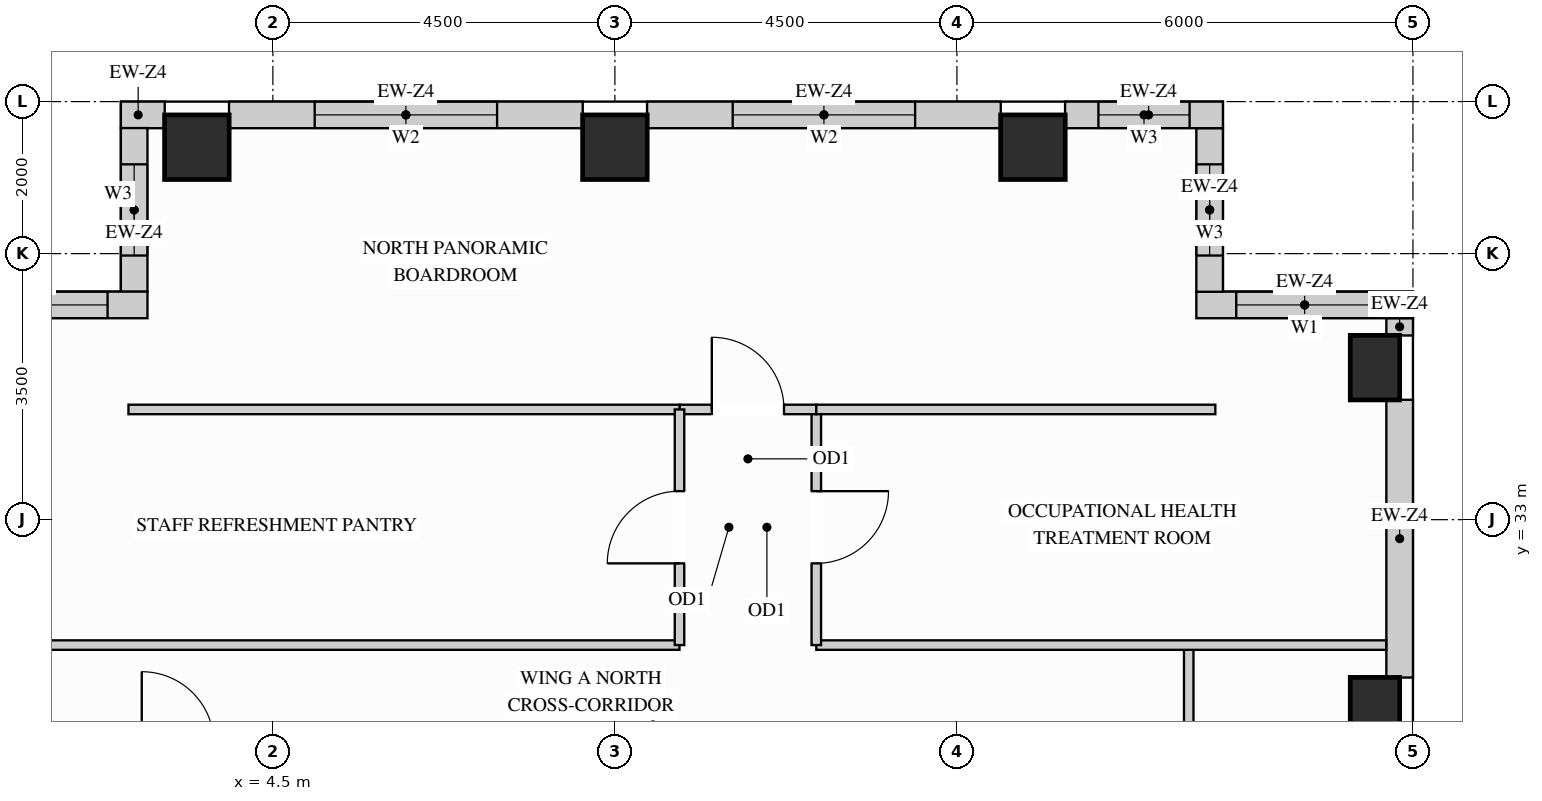
"""IFC4 building model, lengths in metres.
Left out: names, types, materials, properties, quantities, classifications, styles, units other than length and angle.
Written with IfcOpenShell. Run it as: python <this file> out.ifc"""

import sys

from ifc_helpers import new_model, si_unit, direction, frame, frame_2d, origin, origin_2d, place, context, subcontext, project, spatial, rectangle, extrude, source, transform, mapped, element, fill, save


model = new_model("IFC4")
c1 = context("Model", 3, precision=1e-05, world=origin(), true_north=direction((0.0, 1.0)))
c2 = subcontext(c1, "Body", "Model", "MODEL_VIEW")
j1 = project(units=[si_unit("LENGTHUNIT", "METRE"), si_unit("PLANEANGLEUNIT", "RADIAN")], contexts=[c1])
p1 = place(None, origin())
s1 = spatial("IfcSite", under=j1, at=p1, CompositionType="ELEMENT")
p2 = place(p1, origin())
s2 = spatial("IfcBuilding", under=s1, at=p2, CompositionType="ELEMENT")
p3 = place(p2, frame((0.0, 0.0, 226.8)))
s3 = spatial("IfcBuildingStorey", under=s2, at=p3, CompositionType="ELEMENT", Elevation=226.8)
m1 = source(origin(), c2, "Body", "SweptSolid", [
    extrude(rectangle(XDim=0.65, YDim=0.85, at=origin_2d()), origin(), (0.0, 0.0, 1.0), 3.4),
])
for number, where, z_axis, x_axis in (
    (1, (19.0, 30.5, 0.0), (0.0, 0.0, 1.0), (1.0, 0.0, 0.0)),
    (2, (19.0, 35.0, 0.0), (0.0, 0.0, 1.0), (1.0, 0.0, 0.0)),
):
    element("IfcColumn", number, at=place(p3, frame(where, z_axis=z_axis, x_axis=x_axis)), inside=s3, PredefinedType="COLUMN", context=c2, shape_type="MappedRepresentation", body=[
        mapped(m1, transform((0.0, 0.0, 0.0), x_axis=(1.0, 0.0, 0.0), y_axis=(0.0, 1.0, 0.0), z_axis=(0.0, 0.0, 1.0))),
    ])
m2 = source(origin(), c2, "Body", "SweptSolid", [
    extrude(rectangle(XDim=0.85, YDim=0.85, at=origin_2d()), origin(), (0.0, 0.0, 1.0), 3.4),
])
for number, where, z_axis, x_axis in (
    (3, (14.5, 37.9, 0.0), (0.0, 0.0, 1.0), (1.0, 0.0, 0.0)),
    (4, (3.5, 37.9, 0.0), (0.0, 0.0, 1.0), (1.0, 0.0, 0.0)),
    (5, (9.0, 37.9, 0.0), (0.0, 0.0, 1.0), (1.0, 0.0, 0.0)),
):
    element("IfcColumn", number, at=place(p3, frame(where, z_axis=z_axis, x_axis=x_axis)), inside=s3, PredefinedType="COLUMN", context=c2, shape_type="MappedRepresentation", body=[
        mapped(m2, transform((0.0, 0.0, 0.0), x_axis=(1.0, 0.0, 0.0), y_axis=(0.0, 1.0, 0.0), z_axis=(0.0, 0.0, 1.0))),
    ])
m3 = source(origin(), c2, "Body", "SweptSolid", [
    extrude(rectangle(XDim=3.654, YDim=0.35, at=frame_2d((1.827, 0.0))), origin(), (0.0, 0.0, 1.0), 2.619),
])
p4 = place(p3, frame((19.325, 30.923, 0.0), z_axis=(0.0, 0.0, 1.0), x_axis=(0.0, 1.0, 0.0)))
e6 = element("IfcWall", 6, at=p4, inside=s3, PredefinedType="SOLIDWALL", context=c2, shape_type="MappedRepresentation", body=[
    mapped(m3, transform((0.0, 0.0, 0.0), x_axis=(1.0, 0.0, 0.0), y_axis=(0.0, 1.0, 0.0), z_axis=(0.0, 0.0, 1.0))),
])
m4 = source(origin(), c2, "Body", "SweptSolid", [
    extrude(rectangle(XDim=0.229, YDim=0.35, at=frame_2d((0.115, 0.0))), origin(), (0.0, 0.0, 1.0), 3.385),
])
p5 = place(p3, frame((19.325, 35.423, 0.0), z_axis=(0.0, 0.0, 1.0), x_axis=(0.0, 1.0, 0.0)))
e7 = element("IfcWall", 7, at=p5, inside=s3, PredefinedType="SOLIDWALL", context=c2, shape_type="MappedRepresentation", body=[
    mapped(m4, transform((0.0, 0.0, 0.0), x_axis=(1.0, 0.0, 0.0), y_axis=(0.0, 1.0, 0.0), z_axis=(0.0, 0.0, 1.0))),
])
p6 = place(p3, frame((19.5, 35.825, 0.0), z_axis=(0.0, 0.0, 1.0), x_axis=(-1.0, 0.0, 0.0)))
e8 = element("IfcWall", 8, at=p6, inside=s3, PredefinedType="SOLIDWALL", context=c2, shape_type="SweptSolid", body=[
    extrude(rectangle(XDim=2.85, YDim=0.35, at=frame_2d((1.425, 0.0))), origin(), (0.0, 0.0, 1.0), 3.385),
])
p7 = place(p6, frame((0.525, 0.0, 0.78)))
e9 = element("IfcOpeningElement", 9, at=p7, cuts=e8, PredefinedType="OPENING", context=c2, shape_type="SweptSolid", body=[
    extrude(rectangle(XDim=1.8, YDim=2.1, at=frame_2d((0.9, 1.05))), frame((0.0, 0.185, 0.0), z_axis=(0.0, -1.0, 0.0), x_axis=(1.0, 0.0, 0.0)), (0.0, 0.0, 1.0), 0.37),
])
p8 = place(p3, frame((16.825, 35.998, 0.0), z_axis=(0.0, 0.0, 1.0), x_axis=(0.0, 1.0, 0.0)))
e10 = element("IfcWall", 10, at=p8, inside=s3, PredefinedType="SOLIDWALL", context=c2, shape_type="SweptSolid", body=[
    extrude(rectangle(XDim=2.154, YDim=0.35, at=frame_2d((1.077, 0.0))), origin(), (0.0, 0.0, 1.0), 3.385),
])
p9 = place(p8, frame((0.477, 0.0, 0.78)))
e11 = element("IfcOpeningElement", 11, at=p9, cuts=e10, PredefinedType="OPENING", context=c2, shape_type="SweptSolid", body=[
    extrude(rectangle(XDim=1.2, YDim=2.1, at=frame_2d((0.6, 1.05))), frame((0.0, 0.185, 0.0), z_axis=(0.0, -1.0, 0.0), x_axis=(1.0, 0.0, 0.0)), (0.0, 0.0, 1.0), 0.37),
])
p10 = place(p3, frame((17.0, 38.325, 0.0), z_axis=(0.0, 0.0, 1.0), x_axis=(-1.0, 0.0, 0.0)))
e12 = element("IfcWall", 12, at=p10, inside=s3, PredefinedType="SOLIDWALL", context=c2, shape_type="SweptSolid", body=[
    extrude(rectangle(XDim=2.077, YDim=0.35, at=frame_2d((1.039, 0.0))), origin(), (0.0, 0.0, 1.0), 3.385),
])
p11 = place(p10, frame((0.438, 0.0, 0.78)))
e13 = element("IfcOpeningElement", 13, at=p11, cuts=e12, PredefinedType="OPENING", context=c2, shape_type="SweptSolid", body=[
    extrude(rectangle(XDim=1.2, YDim=2.1, at=frame_2d((0.6, 1.05))), frame((0.0, 0.185, 0.0), z_axis=(0.0, -1.0, 0.0), x_axis=(1.0, 0.0, 0.0)), (0.0, 0.0, 1.0), 0.37),
])
p12 = place(p3, frame((14.077, 38.325, 0.0), z_axis=(0.0, 0.0, 1.0), x_axis=(-1.0, 0.0, 0.0)))
e14 = element("IfcWall", 14, at=p12, inside=s3, PredefinedType="SOLIDWALL", context=c2, shape_type="SweptSolid", body=[
    extrude(rectangle(XDim=4.654, YDim=0.35, at=frame_2d((2.327, 0.0))), origin(), (0.0, 0.0, 1.0), 3.385),
])
p13 = place(p12, frame((1.127, 0.0, 0.78)))
e15 = element("IfcOpeningElement", 15, at=p13, cuts=e14, PredefinedType="OPENING", context=c2, shape_type="SweptSolid", body=[
    extrude(rectangle(XDim=2.4, YDim=2.1, at=frame_2d((1.2, 1.05))), frame((0.0, 0.185, 0.0), z_axis=(0.0, -1.0, 0.0), x_axis=(1.0, 0.0, 0.0)), (0.0, 0.0, 1.0), 0.37),
])
p14 = place(p3, frame((8.577, 38.325, 0.0), z_axis=(0.0, 0.0, 1.0), x_axis=(-1.0, 0.0, 0.0)))
e16 = element("IfcWall", 16, at=p14, inside=s3, PredefinedType="SOLIDWALL", context=c2, shape_type="SweptSolid", body=[
    extrude(rectangle(XDim=4.654, YDim=0.35, at=frame_2d((2.327, 0.0))), origin(), (0.0, 0.0, 1.0), 3.385),
])
p15 = place(p14, frame((1.127, 0.0, 0.78)))
e17 = element("IfcOpeningElement", 17, at=p15, cuts=e16, PredefinedType="OPENING", context=c2, shape_type="SweptSolid", body=[
    extrude(rectangle(XDim=2.4, YDim=2.1, at=frame_2d((1.2, 1.05))), frame((0.0, 0.185, 0.0), z_axis=(0.0, -1.0, 0.0), x_axis=(1.0, 0.0, 0.0)), (0.0, 0.0, 1.0), 0.37),
])
m5 = source(origin(), c2, "Body", "SweptSolid", [
    extrude(rectangle(XDim=0.577, YDim=0.35, at=frame_2d((0.289, 0.0))), origin(), (0.0, 0.0, 1.0), 3.385),
])
p16 = place(p3, frame((3.077, 38.325, 0.0), z_axis=(0.0, 0.0, 1.0), x_axis=(-1.0, 0.0, 0.0)))
e18 = element("IfcWall", 18, at=p16, inside=s3, PredefinedType="SOLIDWALL", context=c2, shape_type="MappedRepresentation", body=[
    mapped(m5, transform((0.0, 0.0, 0.0), x_axis=(1.0, 0.0, 0.0), y_axis=(0.0, 1.0, 0.0), z_axis=(0.0, 0.0, 1.0))),
])
p17 = place(p3, frame((2.675, 38.152, 0.0), z_axis=(0.0, 0.0, 1.0), x_axis=(0.0, -1.0, 0.0)))
e19 = element("IfcWall", 19, at=p17, inside=s3, PredefinedType="SOLIDWALL", context=c2, shape_type="SweptSolid", body=[
    extrude(rectangle(XDim=2.154, YDim=0.35, at=frame_2d((1.077, 0.0))), origin(), (0.0, 0.0, 1.0), 3.385),
])
p18 = place(p17, frame((0.477, 0.0, 0.78)))
e20 = element("IfcOpeningElement", 20, at=p18, cuts=e19, PredefinedType="OPENING", context=c2, shape_type="SweptSolid", body=[
    extrude(rectangle(XDim=1.2, YDim=2.1, at=frame_2d((0.6, 1.05))), frame((0.0, 0.185, 0.0), z_axis=(0.0, -1.0, 0.0), x_axis=(1.0, 0.0, 0.0)), (0.0, 0.0, 1.0), 0.37),
])
p19 = place(p3, frame((2.85, 35.825, 0.0), z_axis=(0.0, 0.0, 1.0), x_axis=(-1.0, 0.0, 0.0)))
e21 = element("IfcWall", 21, at=p19, inside=s3, PredefinedType="SOLIDWALL", context=c2, shape_type="SweptSolid", body=[
    extrude(rectangle(XDim=2.85, YDim=0.35, at=frame_2d((1.425, 0.0))), origin(), (0.0, 0.0, 1.0), 3.385),
])
p20 = place(p19, frame((0.525, 0.0, 0.78)))
e22 = element("IfcOpeningElement", 22, at=p20, cuts=e21, PredefinedType="OPENING", context=c2, shape_type="SweptSolid", body=[
    extrude(rectangle(XDim=1.8, YDim=2.1, at=frame_2d((0.9, 1.05))), frame((0.0, 0.185, 0.0), z_axis=(0.0, -1.0, 0.0), x_axis=(1.0, 0.0, 0.0)), (0.0, 0.0, 1.0), 0.37),
])
p21 = place(p3, frame((16.55, 26.05, 0.0), z_axis=(0.0, 0.0, 1.0), x_axis=(0.0, 1.0, 0.0)))
e23 = element("IfcWall", 23, at=p21, inside=s3, PredefinedType="PARTITIONING", context=c2, shape_type="SweptSolid", body=[
    extrude(rectangle(XDim=5.3, YDim=0.125, at=frame_2d((2.65, 0.0))), origin(), (0.0, 0.0, 1.0), 3.385),
])
p22 = place(p21, frame((2.175, 0.0, 0.0)))
e24 = element("IfcOpeningElement", 24, at=p22, cuts=e23, PredefinedType="OPENING", context=c2, shape_type="SweptSolid", body=[
    extrude(rectangle(XDim=0.95, YDim=2.15, at=frame_2d((0.475, 1.075))), frame((0.0, 0.073, 0.0), z_axis=(0.0, -1.0, 0.0), x_axis=(1.0, 0.0, 0.0)), (0.0, 0.0, 1.0), 0.145),
])
m6 = source(origin(), c2, "Body", "SweptSolid", [
    extrude(rectangle(XDim=7.498, YDim=0.125, at=frame_2d((3.749, 0.0))), origin(), (0.0, 0.0, 1.0), 3.385),
])
p23 = place(p3, frame((11.65, 31.35, 0.0), z_axis=(0.0, 0.0, 1.0), x_axis=(1.0, 0.0, 0.0)))
e25 = element("IfcWall", 25, at=p23, inside=s3, PredefinedType="PARTITIONING", context=c2, shape_type="MappedRepresentation", body=[
    mapped(m6, transform((0.0, 0.0, 0.0), x_axis=(1.0, 0.0, 0.0), y_axis=(0.0, 1.0, 0.0), z_axis=(0.0, 0.0, 1.0))),
])
m7 = source(origin(), c2, "Body", "SweptSolid", [
    extrude(rectangle(XDim=9.498, YDim=0.125, at=frame_2d((4.749, 0.0))), origin(), (0.0, 0.0, 1.0), 3.385),
])
p24 = place(p3, frame((0.352, 31.35, 0.0), z_axis=(0.0, 0.0, 1.0), x_axis=(1.0, 0.0, 0.0)))
e26 = element("IfcWall", 26, at=p24, inside=s3, PredefinedType="PARTITIONING", context=c2, shape_type="MappedRepresentation", body=[
    mapped(m7, transform((0.0, 0.0, 0.0), x_axis=(1.0, 0.0, 0.0), y_axis=(0.0, 1.0, 0.0), z_axis=(0.0, 0.0, 1.0))),
])
p25 = place(p3, frame((11.65, 31.35, 0.0), z_axis=(0.0, 0.0, 1.0), x_axis=(0.0, 1.0, 0.0)))
e27 = element("IfcWall", 27, at=p25, inside=s3, PredefinedType="PARTITIONING", context=c2, shape_type="SweptSolid", body=[
    extrude(rectangle(XDim=3.1, YDim=0.125, at=frame_2d((1.55, 0.0))), origin(), (0.0, 0.0, 1.0), 3.385),
])
p26 = place(p25, frame((1.075, 0.0, 0.0)))
e28 = element("IfcOpeningElement", 28, at=p26, cuts=e27, PredefinedType="OPENING", context=c2, shape_type="SweptSolid", body=[
    extrude(rectangle(XDim=0.95, YDim=2.15, at=frame_2d((0.475, 1.075))), frame((0.0, 0.073, 0.0), z_axis=(0.0, -1.0, 0.0), x_axis=(1.0, 0.0, 0.0)), (0.0, 0.0, 1.0), 0.145),
])
p27 = place(p3, frame((9.85, 34.45, 0.0), z_axis=(0.0, 0.0, 1.0), x_axis=(1.0, 0.0, 0.0)))
e29 = element("IfcWall", 29, at=p27, inside=s3, PredefinedType="PARTITIONING", context=c2, shape_type="SweptSolid", body=[
    extrude(rectangle(XDim=1.8, YDim=0.125, at=frame_2d((0.9, 0.0))), origin(), (0.0, 0.0, 1.0), 3.385),
])
p28 = place(p27, frame((0.425, 0.0, 0.0)))
e30 = element("IfcOpeningElement", 30, at=p28, cuts=e29, PredefinedType="OPENING", context=c2, shape_type="SweptSolid", body=[
    extrude(rectangle(XDim=0.95, YDim=2.15, at=frame_2d((0.475, 1.075))), frame((0.0, 0.073, 0.0), z_axis=(0.0, -1.0, 0.0), x_axis=(1.0, 0.0, 0.0)), (0.0, 0.0, 1.0), 0.145),
])
m8 = source(origin(), c2, "Body", "SweptSolid", [
    extrude(rectangle(XDim=5.25, YDim=0.125, at=frame_2d((2.625, 0.0))), origin(), (0.0, 0.0, 1.0), 3.385),
])
p29 = place(p3, frame((11.65, 34.45, 0.0), z_axis=(0.0, 0.0, 1.0), x_axis=(1.0, 0.0, 0.0)))
e31 = element("IfcWall", 31, at=p29, inside=s3, PredefinedType="PARTITIONING", context=c2, shape_type="MappedRepresentation", body=[
    mapped(m8, transform((0.0, 0.0, 0.0), x_axis=(1.0, 0.0, 0.0), y_axis=(0.0, 1.0, 0.0), z_axis=(0.0, 0.0, 1.0))),
])
m9 = source(origin(), c2, "Body", "SweptSolid", [
    extrude(rectangle(XDim=7.25, YDim=0.125, at=frame_2d((3.625, 0.0))), origin(), (0.0, 0.0, 1.0), 3.385),
])
p30 = place(p3, frame((2.6, 34.45, 0.0), z_axis=(0.0, 0.0, 1.0), x_axis=(1.0, 0.0, 0.0)))
e32 = element("IfcWall", 32, at=p30, inside=s3, PredefinedType="PARTITIONING", context=c2, shape_type="MappedRepresentation", body=[
    mapped(m9, transform((0.0, 0.0, 0.0), x_axis=(1.0, 0.0, 0.0), y_axis=(0.0, 1.0, 0.0), z_axis=(0.0, 0.0, 1.0))),
])
p31 = place(p3, frame((9.85, 31.35, 0.0), z_axis=(0.0, 0.0, 1.0), x_axis=(0.0, 1.0, 0.0)))
e33 = element("IfcWall", 33, at=p31, inside=s3, PredefinedType="PARTITIONING", context=c2, shape_type="SweptSolid", body=[
    extrude(rectangle(XDim=3.1, YDim=0.125, at=frame_2d((1.55, 0.0))), origin(), (0.0, 0.0, 1.0), 3.385),
])
p32 = place(p31, frame((1.075, 0.0, 0.0)))
e34 = element("IfcOpeningElement", 34, at=p32, cuts=e33, PredefinedType="OPENING", context=c2, shape_type="SweptSolid", body=[
    extrude(rectangle(XDim=0.95, YDim=2.15, at=frame_2d((0.475, 1.075))), frame((0.0, 0.073, 0.0), z_axis=(0.0, -1.0, 0.0), x_axis=(1.0, 0.0, 0.0)), (0.0, 0.0, 1.0), 0.145),
])
m10 = source(origin(), c2, "Body", "SweptSolid", [
    extrude(rectangle(XDim=0.95, YDim=2.15, at=frame_2d((0.475, 1.075))), frame((0.0, 0.025, 0.0), z_axis=(0.0, -1.0, 0.0), x_axis=(1.0, 0.0, 0.0)), (0.0, 0.0, 1.0), 0.05),
])
p33 = place(p26, origin())
e35 = element("IfcDoor", 35, at=p33, inside=s3, OperationType="SINGLE_SWING_RIGHT", PredefinedType="DOOR", context=c2, shape_type="MappedRepresentation", body=[
    mapped(m10, transform((0.0, 0.0, 0.0), x_axis=(1.0, 0.0, 0.0), y_axis=(0.0, 1.0, 0.0), z_axis=(0.0, 0.0, 1.0))),
])
fill(e28, e35)
p34 = place(p28, origin())
e36 = element("IfcDoor", 36, at=p34, inside=s3, OperationType="SINGLE_SWING_LEFT", PredefinedType="DOOR", context=c2, shape_type="MappedRepresentation", body=[
    mapped(m10, transform((0.0, 0.0, 0.0), x_axis=(1.0, 0.0, 0.0), y_axis=(0.0, 1.0, 0.0), z_axis=(0.0, 0.0, 1.0))),
])
fill(e30, e36)
p35 = place(p32, origin())
e37 = element("IfcDoor", 37, at=p35, inside=s3, OperationType="SINGLE_SWING_LEFT", PredefinedType="DOOR", context=c2, shape_type="MappedRepresentation", body=[
    mapped(m10, transform((0.0, 0.0, 0.0), x_axis=(1.0, 0.0, 0.0), y_axis=(0.0, 1.0, 0.0), z_axis=(0.0, 0.0, 1.0))),
])
fill(e34, e37)
m11 = source(origin(), c2, "Body", "SweptSolid", [
    extrude(rectangle(XDim=1.8, YDim=2.1, at=frame_2d((0.9, 1.05))), frame((0.0, 0.03, 0.0), z_axis=(0.0, -1.0, 0.0), x_axis=(1.0, 0.0, 0.0)), (0.0, 0.0, 1.0), 0.06),
])
p36 = place(p7, origin())
e38 = element("IfcWindow", 38, at=p36, inside=s3, PartitioningType="SINGLE_PANEL", PredefinedType="WINDOW", context=c2, shape_type="MappedRepresentation", body=[
    mapped(m11, transform((0.0, 0.0, 0.0), x_axis=(1.0, 0.0, 0.0), y_axis=(0.0, 1.0, 0.0), z_axis=(0.0, 0.0, 1.0))),
])
fill(e9, e38)
p37 = place(p20, origin())
e39 = element("IfcWindow", 39, at=p37, inside=s3, PartitioningType="SINGLE_PANEL", PredefinedType="WINDOW", context=c2, shape_type="MappedRepresentation", body=[
    mapped(m11, transform((0.0, 0.0, 0.0), x_axis=(1.0, 0.0, 0.0), y_axis=(0.0, 1.0, 0.0), z_axis=(0.0, 0.0, 1.0))),
])
fill(e22, e39)
m12 = source(origin(), c2, "Body", "SweptSolid", [
    extrude(rectangle(XDim=2.4, YDim=2.1, at=frame_2d((1.2, 1.05))), frame((0.0, 0.03, 0.0), z_axis=(0.0, -1.0, 0.0), x_axis=(1.0, 0.0, 0.0)), (0.0, 0.0, 1.0), 0.06),
])
p38 = place(p13, origin())
e40 = element("IfcWindow", 40, at=p38, inside=s3, PartitioningType="SINGLE_PANEL", PredefinedType="WINDOW", context=c2, shape_type="MappedRepresentation", body=[
    mapped(m12, transform((0.0, 0.0, 0.0), x_axis=(1.0, 0.0, 0.0), y_axis=(0.0, 1.0, 0.0), z_axis=(0.0, 0.0, 1.0))),
])
fill(e15, e40)
p39 = place(p15, origin())
e41 = element("IfcWindow", 41, at=p39, inside=s3, PartitioningType="SINGLE_PANEL", PredefinedType="WINDOW", context=c2, shape_type="MappedRepresentation", body=[
    mapped(m12, transform((0.0, 0.0, 0.0), x_axis=(1.0, 0.0, 0.0), y_axis=(0.0, 1.0, 0.0), z_axis=(0.0, 0.0, 1.0))),
])
fill(e17, e41)
m13 = source(origin(), c2, "Body", "SweptSolid", [
    extrude(rectangle(XDim=1.2, YDim=2.1, at=frame_2d((0.6, 1.05))), frame((0.0, 0.03, 0.0), z_axis=(0.0, -1.0, 0.0), x_axis=(1.0, 0.0, 0.0)), (0.0, 0.0, 1.0), 0.06),
])
p40 = place(p9, origin())
e42 = element("IfcWindow", 42, at=p40, inside=s3, PartitioningType="SINGLE_PANEL", PredefinedType="WINDOW", context=c2, shape_type="MappedRepresentation", body=[
    mapped(m13, transform((0.0, 0.0, 0.0), x_axis=(1.0, 0.0, 0.0), y_axis=(0.0, 1.0, 0.0), z_axis=(0.0, 0.0, 1.0))),
])
fill(e11, e42)
p41 = place(p11, origin())
e43 = element("IfcWindow", 43, at=p41, inside=s3, PartitioningType="SINGLE_PANEL", PredefinedType="WINDOW", context=c2, shape_type="MappedRepresentation", body=[
    mapped(m13, transform((0.0, 0.0, 0.0), x_axis=(1.0, 0.0, 0.0), y_axis=(0.0, 1.0, 0.0), z_axis=(0.0, 0.0, 1.0))),
])
fill(e13, e43)
p42 = place(p18, origin())
e44 = element("IfcWindow", 44, at=p42, inside=s3, PartitioningType="SINGLE_PANEL", PredefinedType="WINDOW", context=c2, shape_type="MappedRepresentation", body=[
    mapped(m13, transform((0.0, 0.0, 0.0), x_axis=(1.0, 0.0, 0.0), y_axis=(0.0, 1.0, 0.0), z_axis=(0.0, 0.0, 1.0))),
])
fill(e20, e44)
save(model, sys.argv[1])
